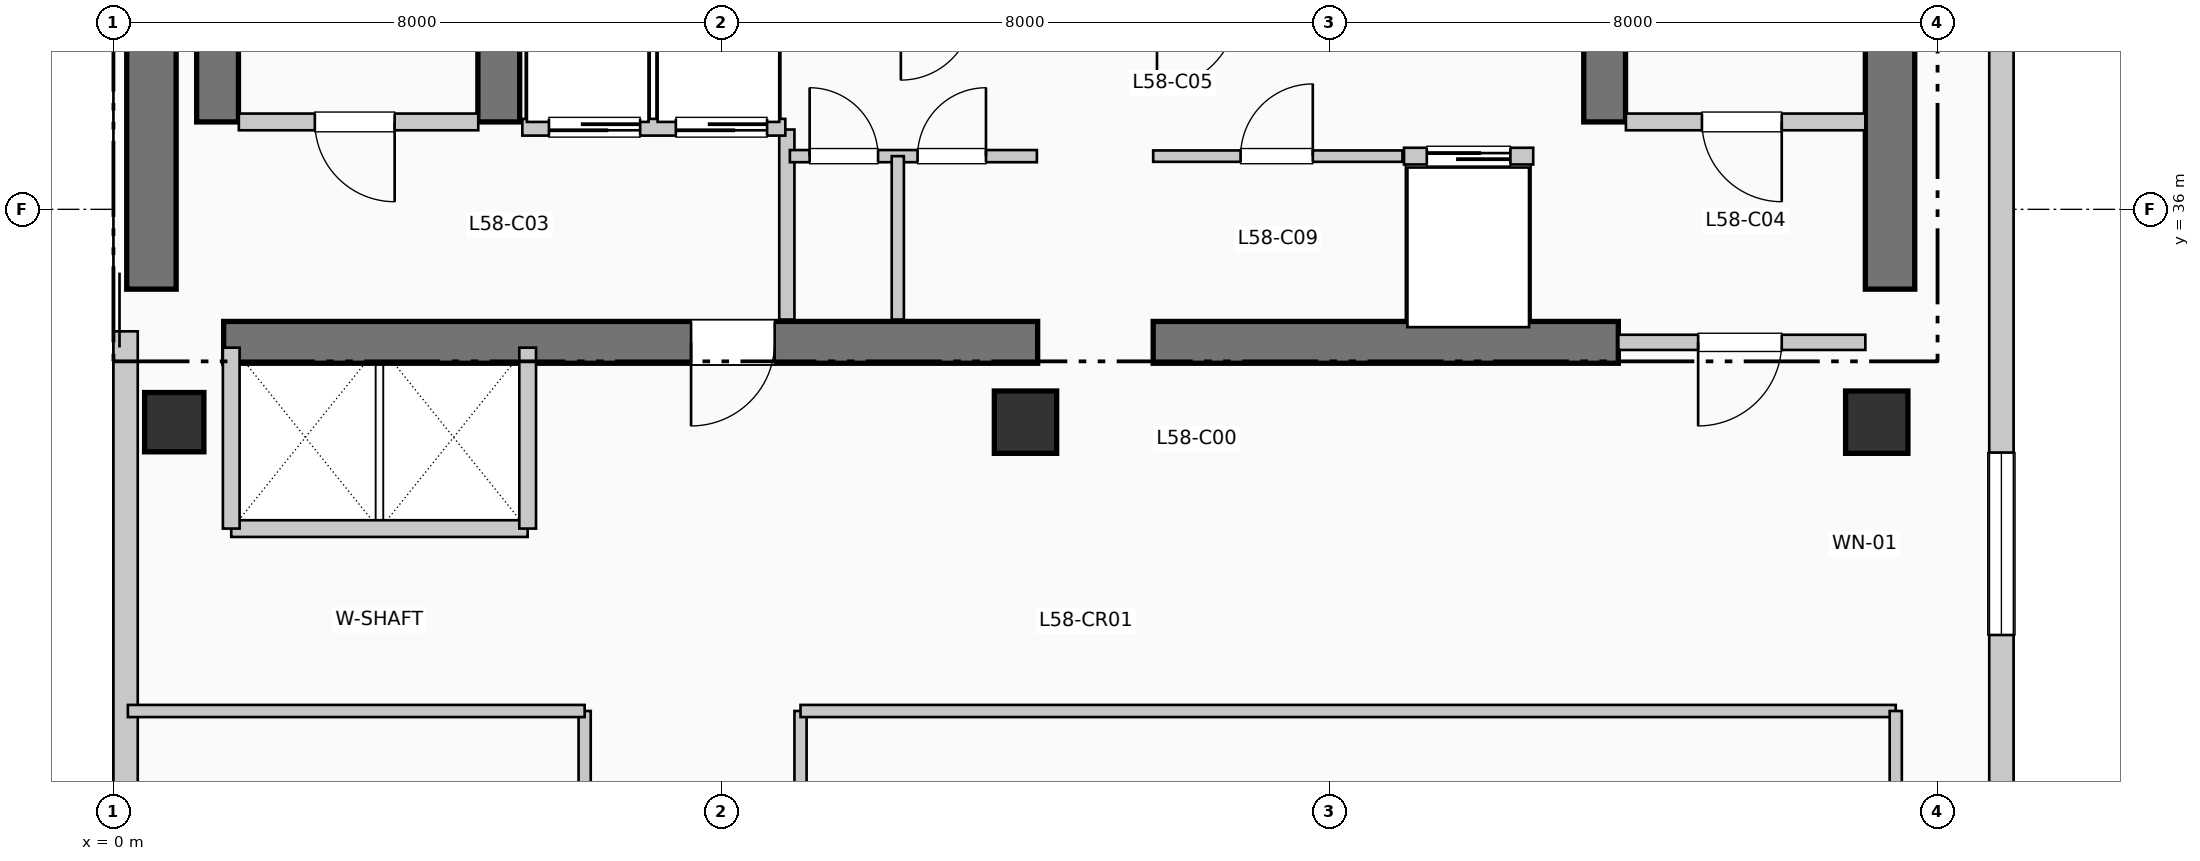
"""IFC4 building model, lengths in metres.
Left out: names, types, materials, properties, quantities, classifications, styles, units other than length and angle.
Written with IfcOpenShell. Run it as: python <this file> out.ifc"""

import sys

from ifc_helpers import new_model, si_unit, direction, frame, frame_2d, origin, origin_2d, place, context, subcontext, project, spatial, rectangle, extrude, element, fill, save


model = new_model("IFC4")
c1 = context("Model", 3, precision=1e-05, world=origin(), true_north=direction((0.0, 1.0)))
c2 = subcontext(c1, "Body", "Model", "MODEL_VIEW")
j1 = project(units=[si_unit("LENGTHUNIT", "METRE"), si_unit("PLANEANGLEUNIT", "RADIAN")], contexts=[c1])
p1 = place(None, origin())
s1 = spatial("IfcSite", under=j1, at=p1, CompositionType="ELEMENT")
p2 = place(p1, origin())
s2 = spatial("IfcBuilding", under=s1, at=p2, CompositionType="ELEMENT")
p3 = place(p2, frame((0.0, 0.0, 239.58)))
s3 = spatial("IfcBuildingStorey", under=s2, at=p3, CompositionType="ELEMENT", Elevation=239.58)
p4 = place(p3, frame((0.5, 34.95, 0.0), z_axis=(0.0, 0.0, 1.0), x_axis=(0.0, 1.0, 0.0)))
e1 = element("IfcWall", 1, at=p4, inside=s3, PredefinedType="SHEAR", context=c2, shape_type="SweptSolid", body=[
    extrude(rectangle(XDim=7.9, YDim=0.65, at=frame_2d((3.95, 0.0))), origin(), (0.0, 0.0, 1.0), 3.96),
])
p5 = place(p3, frame((23.375, 34.95, 0.0), z_axis=(0.0, 0.0, 1.0), x_axis=(0.0, 1.0, 0.0)))
e2 = element("IfcWall", 2, at=p5, inside=s3, PredefinedType="SHEAR", context=c2, shape_type="SweptSolid", body=[
    extrude(rectangle(XDim=10.64, YDim=0.65, at=frame_2d((5.32, 0.0))), origin(), (0.0, 0.0, 1.0), 3.96),
])
p6 = place(p3, frame((1.45, 34.25, 0.0), z_axis=(0.0, 0.0, 1.0), x_axis=(1.0, 0.0, 0.0)))
e3 = element("IfcWall", 3, at=p6, inside=s3, PredefinedType="SHEAR", context=c2, shape_type="SweptSolid", body=[
    extrude(rectangle(XDim=10.71, YDim=0.55, at=frame_2d((5.355, 0.0))), origin(), (0.0, 0.0, 1.0), 3.96),
])
p7 = place(p6, frame((7.25, 0.0, 0.0), z_axis=(0.0, 0.0, 1.0), x_axis=(-1.0, 0.0, 0.0)))
e4 = element("IfcOpeningElement", 4, at=p7, cuts=e3, PredefinedType="OPENING", context=c2, shape_type="SweptSolid", body=[
    extrude(rectangle(XDim=1.1, YDim=2.15, at=frame_2d((0.55, 1.075))), frame((0.0, 0.285, 0.0), z_axis=(0.0, -1.0, 0.0), x_axis=(1.0, 0.0, 0.0)), (0.0, 0.0, 1.0), 0.57),
])
p8 = place(p3, frame((13.68, 34.25, 0.0), z_axis=(0.0, 0.0, 1.0), x_axis=(1.0, 0.0, 0.0)))
e5 = element("IfcWall", 5, at=p8, inside=s3, PredefinedType="SHEAR", context=c2, shape_type="SweptSolid", body=[
    extrude(rectangle(XDim=6.12, YDim=0.55, at=frame_2d((3.06, 0.0))), origin(), (0.0, 0.0, 1.0), 3.96),
])
for number, where, z_axis, x_axis in (
    (6, (1.37, 37.15, 0.0), (0.0, 0.0, 1.0), (0.0, 1.0, 0.0)),
    (7, (5.07, 37.15, 0.0), (0.0, 0.0, 1.0), (0.0, 1.0, 0.0)),
    (8, (19.62, 37.15, 0.0), (0.0, 0.0, 1.0), (0.0, 1.0, 0.0)),
):
    element("IfcWall", number, at=place(p3, frame(where, z_axis=z_axis, x_axis=x_axis)), inside=s3, PredefinedType="SHEAR", context=c2, shape_type="SweptSolid", body=[
        extrude(rectangle(XDim=7.89, YDim=0.55, at=frame_2d((3.945, 0.0))), origin(), (0.0, 0.0, 1.0), 3.96),
    ])
p9 = place(p3, frame((0.8, 33.2, 0.0), z_axis=(0.0, 0.0, 1.0), x_axis=(1.0, 0.0, 0.0)))
e9 = element("IfcColumn", 9, at=p9, inside=s3, PredefinedType="COLUMN", context=c2, shape_type="SweptSolid", body=[
    extrude(rectangle(XDim=0.78, YDim=0.78, at=origin_2d()), origin(), (0.0, 0.0, 1.0), 3.96),
])
for number, where, z_axis, x_axis in (
    (10, (12.0, 33.2, 0.0), (0.0, 0.0, 1.0), (1.0, 0.0, 0.0)),
    (11, (23.2, 33.2, 0.0), (0.0, 0.0, 1.0), (1.0, 0.0, 0.0)),
):
    element("IfcColumn", number, at=place(p3, frame(where, z_axis=z_axis, x_axis=x_axis)), inside=s3, PredefinedType="COLUMN", context=c2, shape_type="SweptSolid", body=[
        extrude(rectangle(XDim=0.82, YDim=0.82, at=origin_2d()), origin(), (0.0, 0.0, 1.0), 3.96),
    ])
p10 = place(p3, frame((24.84, 22.055, 0.0), z_axis=(0.0, 0.0, 1.0), x_axis=(0.0, 1.0, 0.0)))
e12 = element("IfcWall", 12, at=p10, inside=s3, PredefinedType="SOLIDWALL", context=c2, shape_type="SweptSolid", body=[
    extrude(rectangle(XDim=19.09, YDim=0.32, at=frame_2d((9.545, 0.0))), origin(), (0.0, 0.0, 1.0), 3.71),
])
p11 = place(p10, frame((8.345, 0.0, 0.85)))
e13 = element("IfcOpeningElement", 13, at=p11, cuts=e12, PredefinedType="OPENING", context=c2, shape_type="SweptSolid", body=[
    extrude(rectangle(XDim=2.4, YDim=2.05, at=frame_2d((1.2, 1.025))), frame((0.0, 0.17, 0.0), z_axis=(0.0, -1.0, 0.0), x_axis=(1.0, 0.0, 0.0)), (0.0, 0.0, 1.0), 0.34),
])
p12 = place(p3, frame((0.16, 34.395, 0.0), z_axis=(0.0, 0.0, 1.0), x_axis=(0.0, -1.0, 0.0)))
e14 = element("IfcWall", 14, at=p12, inside=s3, PredefinedType="SOLIDWALL", context=c2, shape_type="SweptSolid", body=[
    extrude(rectangle(XDim=25.54, YDim=0.32, at=frame_2d((12.77, 0.0))), origin(), (0.0, 0.0, 1.0), 3.71),
])
p13 = place(p3, frame((1.65, 37.15, 0.0), z_axis=(0.0, 0.0, 1.0), x_axis=(1.0, 0.0, 0.0)))
e15 = element("IfcWall", 15, at=p13, inside=s3, PredefinedType="PARTITIONING", context=c2, shape_type="SweptSolid", body=[
    extrude(rectangle(XDim=3.15, YDim=0.22, at=frame_2d((1.575, 0.0))), origin(), (0.0, 0.0, 1.0), 3.71),
])
p14 = place(p13, frame((2.05, 0.0, 0.0), z_axis=(0.0, 0.0, 1.0), x_axis=(-1.0, 0.0, 0.0)))
e16 = element("IfcOpeningElement", 16, at=p14, cuts=e15, PredefinedType="OPENING", context=c2, shape_type="SweptSolid", body=[
    extrude(rectangle(XDim=1.05, YDim=2.15, at=frame_2d((0.525, 1.075))), frame((0.0, 0.12, 0.0), z_axis=(0.0, -1.0, 0.0), x_axis=(1.0, 0.0, 0.0)), (0.0, 0.0, 1.0), 0.24),
])
p15 = place(p3, frame((8.86, 34.55, 0.0), z_axis=(0.0, 0.0, 1.0), x_axis=(0.0, 1.0, 0.0)))
e17 = element("IfcWall", 17, at=p15, inside=s3, PredefinedType="PARTITIONING", context=c2, shape_type="SweptSolid", body=[
    extrude(rectangle(XDim=2.5, YDim=0.2, at=frame_2d((1.25, 0.0))), origin(), (0.0, 0.0, 1.0), 3.71),
])
p16 = place(p3, frame((19.9, 37.15, 0.0), z_axis=(0.0, 0.0, 1.0), x_axis=(1.0, 0.0, 0.0)))
e18 = element("IfcWall", 18, at=p16, inside=s3, PredefinedType="PARTITIONING", context=c2, shape_type="SweptSolid", body=[
    extrude(rectangle(XDim=3.15, YDim=0.22, at=frame_2d((1.575, 0.0))), origin(), (0.0, 0.0, 1.0), 3.71),
])
p17 = place(p16, frame((2.05, 0.0, 0.0), z_axis=(0.0, 0.0, 1.0), x_axis=(-1.0, 0.0, 0.0)))
e19 = element("IfcOpeningElement", 19, at=p17, cuts=e18, PredefinedType="OPENING", context=c2, shape_type="SweptSolid", body=[
    extrude(rectangle(XDim=1.05, YDim=2.15, at=frame_2d((0.525, 1.075))), frame((0.0, 0.12, 0.0), z_axis=(0.0, -1.0, 0.0), x_axis=(1.0, 0.0, 0.0)), (0.0, 0.0, 1.0), 0.24),
])
p18 = place(p3, frame((19.8, 34.25, 0.0), z_axis=(0.0, 0.0, 1.0), x_axis=(1.0, 0.0, 0.0)))
e20 = element("IfcWall", 20, at=p18, inside=s3, PredefinedType="PARTITIONING", context=c2, shape_type="SweptSolid", body=[
    extrude(rectangle(XDim=3.25, YDim=0.2, at=frame_2d((1.625, 0.0))), origin(), (0.0, 0.0, 1.0), 3.71),
])
p19 = place(p18, frame((2.15, 0.0, 0.0), z_axis=(0.0, 0.0, 1.0), x_axis=(-1.0, 0.0, 0.0)))
e21 = element("IfcOpeningElement", 21, at=p19, cuts=e20, PredefinedType="OPENING", context=c2, shape_type="SweptSolid", body=[
    extrude(rectangle(XDim=1.1, YDim=2.15, at=frame_2d((0.55, 1.075))), frame((0.0, 0.11, 0.0), z_axis=(0.0, -1.0, 0.0), x_axis=(1.0, 0.0, 0.0)), (0.0, 0.0, 1.0), 0.22),
])
p20 = place(p3, frame((5.38, 37.08, 0.0), z_axis=(0.0, 0.0, 1.0), x_axis=(1.0, 0.0, 0.0)))
e22 = element("IfcWall", 22, at=p20, inside=s3, PredefinedType="PARTITIONING", context=c2, shape_type="SweptSolid", body=[
    extrude(rectangle(XDim=3.46, YDim=0.22, at=frame_2d((1.73, 0.0))), origin(), (0.0, 0.0, 1.0), 3.71),
])
p21 = place(p20, frame((1.55, 0.0, 0.0), z_axis=(0.0, 0.0, 1.0), x_axis=(-1.0, 0.0, 0.0)))
e23 = element("IfcOpeningElement", 23, at=p21, cuts=e22, PredefinedType="OPENING", context=c2, shape_type="SweptSolid", body=[
    extrude(rectangle(XDim=1.2, YDim=2.2, at=frame_2d((0.6, 1.1))), frame((0.0, 0.12, 0.0), z_axis=(0.0, -1.0, 0.0), x_axis=(1.0, 0.0, 0.0)), (0.0, 0.0, 1.0), 0.24),
])
p22 = place(p20, frame((3.22, 0.0, 0.0), z_axis=(0.0, 0.0, 1.0), x_axis=(-1.0, 0.0, 0.0)))
e24 = element("IfcOpeningElement", 24, at=p22, cuts=e22, PredefinedType="OPENING", context=c2, shape_type="SweptSolid", body=[
    extrude(rectangle(XDim=1.2, YDim=2.2, at=frame_2d((0.6, 1.1))), frame((0.0, 0.12, 0.0), z_axis=(0.0, -1.0, 0.0), x_axis=(1.0, 0.0, 0.0)), (0.0, 0.0, 1.0), 0.24),
])
p23 = place(p3, frame((1.55, 31.8, 0.0), z_axis=(0.0, 0.0, 1.0), x_axis=(1.0, 0.0, 0.0)))
e25 = element("IfcWall", 25, at=p23, inside=s3, PredefinedType="PARTITIONING", context=c2, shape_type="SweptSolid", body=[
    extrude(rectangle(XDim=3.9, YDim=0.22, at=frame_2d((1.95, 0.0))), origin(), (0.0, 0.0, 1.0), 3.71),
])
for number, where, z_axis, x_axis in (
    (26, (1.55, 31.8, 0.0), (0.0, 0.0, 1.0), (0.0, 1.0, 0.0)),
    (27, (5.45, 31.8, 0.0), (0.0, 0.0, 1.0), (0.0, 1.0, 0.0)),
):
    element("IfcWall", number, at=place(p3, frame(where, z_axis=z_axis, x_axis=x_axis)), inside=s3, PredefinedType="PARTITIONING", context=c2, shape_type="SweptSolid", body=[
        extrude(rectangle(XDim=2.38, YDim=0.22, at=frame_2d((1.19, 0.0))), origin(), (0.0, 0.0, 1.0), 3.71),
    ])
p24 = place(p3, frame((8.9, 36.7, 0.0), z_axis=(0.0, 0.0, 1.0), x_axis=(1.0, 0.0, 0.0)))
e28 = element("IfcWall", 28, at=p24, inside=s3, PredefinedType="PARTITIONING", context=c2, shape_type="SweptSolid", body=[
    extrude(rectangle(XDim=3.25, YDim=0.16, at=frame_2d((1.625, 0.0))), origin(), (0.0, 0.0, 1.0), 3.71),
])
p25 = place(p24, frame((0.26, 0.0, 0.0)))
e29 = element("IfcOpeningElement", 29, at=p25, cuts=e28, PredefinedType="OPENING", context=c2, shape_type="SweptSolid", body=[
    extrude(rectangle(XDim=0.9, YDim=2.15, at=frame_2d((0.45, 1.075))), frame((0.0, 0.09, 0.0), z_axis=(0.0, -1.0, 0.0), x_axis=(1.0, 0.0, 0.0)), (0.0, 0.0, 1.0), 0.18),
])
p26 = place(p24, frame((1.68, 0.0, 0.0)))
e30 = element("IfcOpeningElement", 30, at=p26, cuts=e28, PredefinedType="OPENING", context=c2, shape_type="SweptSolid", body=[
    extrude(rectangle(XDim=0.9, YDim=2.15, at=frame_2d((0.45, 1.075))), frame((0.0, 0.09, 0.0), z_axis=(0.0, -1.0, 0.0), x_axis=(1.0, 0.0, 0.0)), (0.0, 0.0, 1.0), 0.18),
])
p27 = place(p3, frame((10.32, 34.55, 0.0), z_axis=(0.0, 0.0, 1.0), x_axis=(0.0, 1.0, 0.0)))
e31 = element("IfcWall", 31, at=p27, inside=s3, PredefinedType="PARTITIONING", context=c2, shape_type="SweptSolid", body=[
    extrude(rectangle(XDim=2.15, YDim=0.16, at=frame_2d((1.075, 0.0))), origin(), (0.0, 0.0, 1.0), 3.71),
])
p28 = place(p3, frame((13.68, 36.7, 0.0), z_axis=(0.0, 0.0, 1.0), x_axis=(1.0, 0.0, 0.0)))
e32 = element("IfcWall", 32, at=p28, inside=s3, PredefinedType="PARTITIONING", context=c2, shape_type="SweptSolid", body=[
    extrude(rectangle(XDim=3.28, YDim=0.15, at=frame_2d((1.64, 0.0))), origin(), (0.0, 0.0, 1.0), 3.71),
])
p29 = place(p28, frame((1.15, 0.0, 0.0)))
e33 = element("IfcOpeningElement", 33, at=p29, cuts=e32, PredefinedType="OPENING", context=c2, shape_type="SweptSolid", body=[
    extrude(rectangle(XDim=0.95, YDim=2.15, at=frame_2d((0.475, 1.075))), frame((0.0, 0.085, 0.0), z_axis=(0.0, -1.0, 0.0), x_axis=(1.0, 0.0, 0.0)), (0.0, 0.0, 1.0), 0.17),
])
p30 = place(p3, frame((16.98, 36.7, 0.0), z_axis=(0.0, 0.0, 1.0), x_axis=(1.0, 0.0, 0.0)))
e34 = element("IfcWall", 34, at=p30, inside=s3, PredefinedType="PARTITIONING", context=c2, shape_type="SweptSolid", body=[
    extrude(rectangle(XDim=1.7, YDim=0.22, at=frame_2d((0.85, 0.0))), origin(), (0.0, 0.0, 1.0), 3.71),
])
p31 = place(p30, frame((0.3, 0.0, 0.0)))
e35 = element("IfcOpeningElement", 35, at=p31, cuts=e34, PredefinedType="OPENING", context=c2, shape_type="SweptSolid", body=[
    extrude(rectangle(XDim=1.1, YDim=2.2, at=frame_2d((0.55, 1.1))), frame((0.0, 0.12, 0.0), z_axis=(0.0, -1.0, 0.0), x_axis=(1.0, 0.0, 0.0)), (0.0, 0.0, 1.0), 0.24),
])
p32 = place(p3, frame((6.2, 11.6, 0.0), z_axis=(0.0, 0.0, 1.0), x_axis=(0.0, 1.0, 0.0)))
e36 = element("IfcWall", 36, at=p32, inside=s3, PredefinedType="PARTITIONING", context=c2, shape_type="SweptSolid", body=[
    extrude(rectangle(XDim=17.8, YDim=0.16, at=frame_2d((8.9, 0.0))), origin(), (0.0, 0.0, 1.0), 3.71),
])
p33 = place(p32, frame((3.857, 0.0, 0.0), z_axis=(0.0, 0.0, 1.0), x_axis=(-1.0, 0.0, 0.0)))
e37 = element("IfcOpeningElement", 37, at=p33, cuts=e36, PredefinedType="OPENING", context=c2, shape_type="SweptSolid", body=[
    extrude(rectangle(XDim=0.95, YDim=2.15, at=frame_2d((0.475, 1.075))), frame((0.0, 0.09, 0.0), z_axis=(0.0, -1.0, 0.0), x_axis=(1.0, 0.0, 0.0)), (0.0, 0.0, 1.0), 0.18),
])
p34 = place(p32, frame((12.757, 0.0, 0.0), z_axis=(0.0, 0.0, 1.0), x_axis=(-1.0, 0.0, 0.0)))
e38 = element("IfcOpeningElement", 38, at=p34, cuts=e36, PredefinedType="OPENING", context=c2, shape_type="SweptSolid", body=[
    extrude(rectangle(XDim=0.95, YDim=2.15, at=frame_2d((0.475, 1.075))), frame((0.0, 0.09, 0.0), z_axis=(0.0, -1.0, 0.0), x_axis=(1.0, 0.0, 0.0)), (0.0, 0.0, 1.0), 0.18),
])
p35 = place(p3, frame((9.04, 11.6, 0.0), z_axis=(0.0, 0.0, 1.0), x_axis=(0.0, 1.0, 0.0)))
e39 = element("IfcWall", 39, at=p35, inside=s3, PredefinedType="PARTITIONING", context=c2, shape_type="SweptSolid", body=[
    extrude(rectangle(XDim=17.8, YDim=0.16, at=frame_2d((8.9, 0.0))), origin(), (0.0, 0.0, 1.0), 3.71),
])
p36 = place(p35, frame((2.195, 0.0, 0.0)))
e40 = element("IfcOpeningElement", 40, at=p36, cuts=e39, PredefinedType="OPENING", context=c2, shape_type="SweptSolid", body=[
    extrude(rectangle(XDim=0.95, YDim=2.15, at=frame_2d((0.475, 1.075))), frame((0.0, 0.09, 0.0), z_axis=(0.0, -1.0, 0.0), x_axis=(1.0, 0.0, 0.0)), (0.0, 0.0, 1.0), 0.18),
])
p37 = place(p35, frame((7.891, 0.0, 0.0)))
e41 = element("IfcOpeningElement", 41, at=p37, cuts=e39, PredefinedType="OPENING", context=c2, shape_type="SweptSolid", body=[
    extrude(rectangle(XDim=0.95, YDim=2.15, at=frame_2d((0.475, 1.075))), frame((0.0, 0.09, 0.0), z_axis=(0.0, -1.0, 0.0), x_axis=(1.0, 0.0, 0.0)), (0.0, 0.0, 1.0), 0.18),
])
p38 = place(p35, frame((14.121, 0.0, 0.0)))
e42 = element("IfcOpeningElement", 42, at=p38, cuts=e39, PredefinedType="OPENING", context=c2, shape_type="SweptSolid", body=[
    extrude(rectangle(XDim=0.95, YDim=2.15, at=frame_2d((0.475, 1.075))), frame((0.0, 0.09, 0.0), z_axis=(0.0, -1.0, 0.0), x_axis=(1.0, 0.0, 0.0)), (0.0, 0.0, 1.0), 0.18),
])
p39 = place(p3, frame((0.19, 29.4, 0.0), z_axis=(0.0, 0.0, 1.0), x_axis=(1.0, 0.0, 0.0)))
e43 = element("IfcWall", 43, at=p39, inside=s3, PredefinedType="PARTITIONING", context=c2, shape_type="SweptSolid", body=[
    extrude(rectangle(XDim=6.01, YDim=0.16, at=frame_2d((3.005, 0.0))), origin(), (0.0, 0.0, 1.0), 3.365),
])
p40 = place(p3, frame((9.04, 29.4, 0.0), z_axis=(0.0, 0.0, 1.0), x_axis=(1.0, 0.0, 0.0)))
e44 = element("IfcWall", 44, at=p40, inside=s3, PredefinedType="PARTITIONING", context=c2, shape_type="SweptSolid", body=[
    extrude(rectangle(XDim=14.41, YDim=0.16, at=frame_2d((7.205, 0.0))), origin(), (0.0, 0.0, 1.0), 3.365),
])
p41 = place(p3, frame((23.45, 5.99, 0.0), z_axis=(0.0, 0.0, 1.0), x_axis=(0.0, 1.0, 0.0)))
e45 = element("IfcWall", 45, at=p41, inside=s3, PredefinedType="PARTITIONING", context=c2, shape_type="SweptSolid", body=[
    extrude(rectangle(XDim=23.41, YDim=0.16, at=frame_2d((11.705, 0.0))), origin(), (0.0, 0.0, 1.0), 3.095),
])
p42 = place(p11, origin())
e46 = element("IfcWindow", 46, at=p42, inside=s3, PartitioningType="SINGLE_PANEL", PredefinedType="WINDOW", context=c2, shape_type="SweptSolid", body=[
    extrude(rectangle(XDim=2.4, YDim=2.05, at=frame_2d((1.2, 1.025))), frame((0.0, 0.03, 0.0), z_axis=(0.0, -1.0, 0.0), x_axis=(1.0, 0.0, 0.0)), (0.0, 0.0, 1.0), 0.06),
])
fill(e13, e46)
p43 = place(p14, origin())
e47 = element("IfcDoor", 47, at=p43, inside=s3, OperationType="SINGLE_SWING_RIGHT", PredefinedType="DOOR", context=c2, shape_type="SweptSolid", body=[
    extrude(rectangle(XDim=1.05, YDim=2.15, at=frame_2d((0.525, 1.075))), frame((0.0, 0.025, 0.0), z_axis=(0.0, -1.0, 0.0), x_axis=(1.0, 0.0, 0.0)), (0.0, 0.0, 1.0), 0.05),
])
fill(e16, e47)
p44 = place(p7, origin())
e48 = element("IfcDoor", 48, at=p44, inside=s3, OperationType="SINGLE_SWING_LEFT", PredefinedType="DOOR", context=c2, shape_type="SweptSolid", body=[
    extrude(rectangle(XDim=1.1, YDim=2.15, at=frame_2d((0.55, 1.075))), frame((0.0, 0.025, 0.0), z_axis=(0.0, -1.0, 0.0), x_axis=(1.0, 0.0, 0.0)), (0.0, 0.0, 1.0), 0.05),
])
fill(e4, e48)
p45 = place(p17, origin())
e49 = element("IfcDoor", 49, at=p45, inside=s3, OperationType="SINGLE_SWING_RIGHT", PredefinedType="DOOR", context=c2, shape_type="SweptSolid", body=[
    extrude(rectangle(XDim=1.05, YDim=2.15, at=frame_2d((0.525, 1.075))), frame((0.0, 0.025, 0.0), z_axis=(0.0, -1.0, 0.0), x_axis=(1.0, 0.0, 0.0)), (0.0, 0.0, 1.0), 0.05),
])
fill(e19, e49)
p46 = place(p19, origin())
e50 = element("IfcDoor", 50, at=p46, inside=s3, OperationType="SINGLE_SWING_LEFT", PredefinedType="DOOR", context=c2, shape_type="SweptSolid", body=[
    extrude(rectangle(XDim=1.1, YDim=2.15, at=frame_2d((0.55, 1.075))), frame((0.0, 0.025, 0.0), z_axis=(0.0, -1.0, 0.0), x_axis=(1.0, 0.0, 0.0)), (0.0, 0.0, 1.0), 0.05),
])
fill(e21, e50)
p47 = place(p21, origin())
e51 = element("IfcDoor", 51, at=p47, inside=s3, OperationType="SLIDING_TO_RIGHT", PredefinedType="DOOR", context=c2, shape_type="SweptSolid", body=[
    extrude(rectangle(XDim=1.2, YDim=2.2, at=frame_2d((0.6, 1.1))), frame((0.0, 0.025, 0.0), z_axis=(0.0, -1.0, 0.0), x_axis=(1.0, 0.0, 0.0)), (0.0, 0.0, 1.0), 0.05),
])
fill(e23, e51)
p48 = place(p22, origin())
e52 = element("IfcDoor", 52, at=p48, inside=s3, OperationType="SLIDING_TO_RIGHT", PredefinedType="DOOR", context=c2, shape_type="SweptSolid", body=[
    extrude(rectangle(XDim=1.2, YDim=2.2, at=frame_2d((0.6, 1.1))), frame((0.0, 0.025, 0.0), z_axis=(0.0, -1.0, 0.0), x_axis=(1.0, 0.0, 0.0)), (0.0, 0.0, 1.0), 0.05),
])
fill(e24, e52)
p49 = place(p25, origin())
e53 = element("IfcDoor", 53, at=p49, inside=s3, OperationType="SINGLE_SWING_LEFT", PredefinedType="DOOR", context=c2, shape_type="SweptSolid", body=[
    extrude(rectangle(XDim=0.9, YDim=2.15, at=frame_2d((0.45, 1.075))), frame((0.0, 0.025, 0.0), z_axis=(0.0, -1.0, 0.0), x_axis=(1.0, 0.0, 0.0)), (0.0, 0.0, 1.0), 0.05),
])
fill(e29, e53)
p50 = place(p26, origin())
e54 = element("IfcDoor", 54, at=p50, inside=s3, OperationType="SINGLE_SWING_RIGHT", PredefinedType="DOOR", context=c2, shape_type="SweptSolid", body=[
    extrude(rectangle(XDim=0.9, YDim=2.15, at=frame_2d((0.45, 1.075))), frame((0.0, 0.025, 0.0), z_axis=(0.0, -1.0, 0.0), x_axis=(1.0, 0.0, 0.0)), (0.0, 0.0, 1.0), 0.05),
])
fill(e30, e54)
p51 = place(p29, origin())
e55 = element("IfcDoor", 55, at=p51, inside=s3, OperationType="SINGLE_SWING_RIGHT", PredefinedType="DOOR", context=c2, shape_type="SweptSolid", body=[
    extrude(rectangle(XDim=0.95, YDim=2.15, at=frame_2d((0.475, 1.075))), frame((0.0, 0.025, 0.0), z_axis=(0.0, -1.0, 0.0), x_axis=(1.0, 0.0, 0.0)), (0.0, 0.0, 1.0), 0.05),
])
fill(e33, e55)
p52 = place(p31, origin())
e56 = element("IfcDoor", 56, at=p52, inside=s3, OperationType="SLIDING_TO_LEFT", PredefinedType="DOOR", context=c2, shape_type="SweptSolid", body=[
    extrude(rectangle(XDim=1.1, YDim=2.2, at=frame_2d((0.55, 1.1))), frame((0.0, 0.025, 0.0), z_axis=(0.0, -1.0, 0.0), x_axis=(1.0, 0.0, 0.0)), (0.0, 0.0, 1.0), 0.05),
])
fill(e35, e56)
save(model, sys.argv[1])
